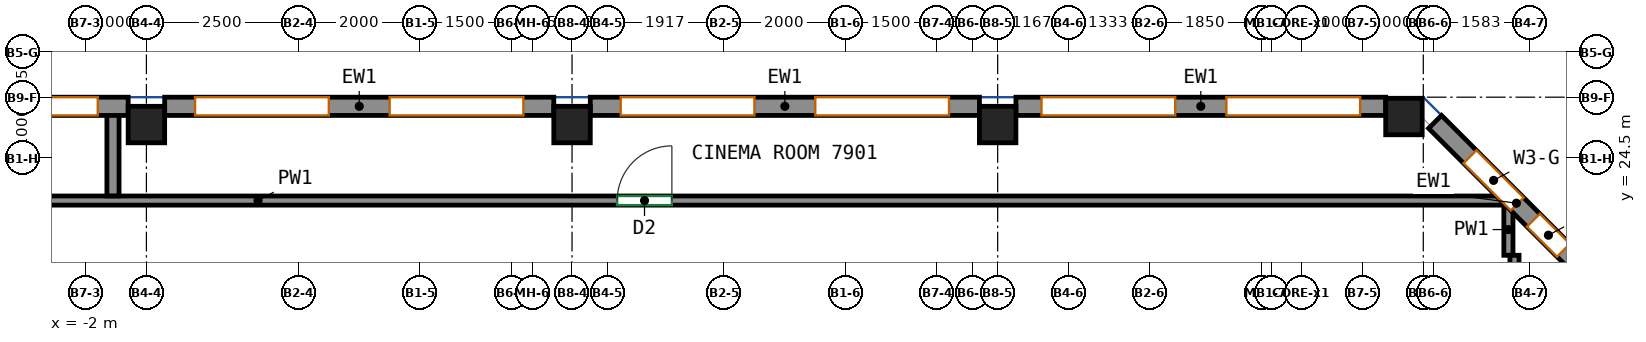
"""IFC4 building model, lengths in metres.
Left out: names, types, materials, properties, quantities, classifications, styles, units other than length and angle.
Written with IfcOpenShell. Run it as: python <this file> out.ifc"""

import sys

from ifc_helpers import new_model, si_unit, direction, frame, frame_2d, origin, origin_2d, place, context, subcontext, project, spatial, rectangle, extrude, source, transform, mapped, element, fill, save


model = new_model("IFC4")
c1 = context("Model", 3, precision=1e-05, world=origin(), true_north=direction((0.0, 1.0)))
c2 = subcontext(c1, "Body", "Model", "MODEL_VIEW")
j1 = project(units=[si_unit("LENGTHUNIT", "METRE"), si_unit("PLANEANGLEUNIT", "RADIAN")], contexts=[c1])
p1 = place(None, origin())
s1 = spatial("IfcSite", under=j1, at=p1, CompositionType="ELEMENT")
p2 = place(p1, origin())
s2 = spatial("IfcBuilding", under=s1, at=p2, CompositionType="ELEMENT")
p3 = place(p2, frame((0.0, 0.0, 315.4)))
s3 = spatial("IfcBuildingStorey", under=s2, at=p3, CompositionType="ELEMENT", Elevation=315.4)
m1 = source(origin(), c2, "Body", "SweptSolid", [
    extrude(rectangle(XDim=0.6, YDim=0.6, at=origin_2d()), origin(), (0.0, 0.0, 1.0), 3.0),
])
for number, where, z_axis, x_axis in (
    (1, (-1.0, 25.05, 0.0), (0.0, 0.0, 1.0), (1.0, 0.0, 0.0)),
    (2, (6.0, 25.05, 0.0), (0.0, 0.0, 1.0), (1.0, 0.0, 0.0)),
    (3, (13.0, 25.05, 0.0), (0.0, 0.0, 1.0), (1.0, 0.0, 0.0)),
    (4, (19.682, 25.182, 0.0), (0.0, 0.0, 1.0), (1.0, 0.0, 0.0)),
):
    element("IfcColumn", number, at=place(p3, frame(where, z_axis=z_axis, x_axis=x_axis)), inside=s3, PredefinedType="COLUMN", context=c2, shape_type="MappedRepresentation", body=[
        mapped(m1, transform((0.0, 0.0, 0.0))),
    ])
m2 = source(origin(), c2, "Body", "SweptSolid", [
    extrude(rectangle(XDim=3.783, YDim=0.3, at=frame_2d((1.892, 0.0))), origin(), (0.0, 0.0, 1.0), 3.0),
])
p4 = place(p3, frame((22.869, 22.419, 0.0), z_axis=(0.0, 0.0, 1.0), x_axis=(-0.707106781187, 0.707106781187, 0.0)))
e5 = element("IfcWall", 5, at=p4, inside=s3, PredefinedType="SOLIDWALL", context=c2, shape_type="MappedRepresentation", body=[
    mapped(m2, transform((0.0, 0.0, 0.0))),
])
p5 = place(p4, frame((0.797, 0.0, 0.8)))
e6 = element("IfcOpeningElement", 6, at=p5, cuts=e5, PredefinedType="OPENING", context=c2, shape_type="SweptSolid", body=[
    extrude(rectangle(XDim=0.7, YDim=2.05, at=frame_2d((0.35, 1.025))), frame((0.0, 0.16, 0.0), z_axis=(0.0, -1.0, 0.0), x_axis=(1.0, 0.0, 0.0)), (0.0, 0.0, 1.0), 0.32),
])
p6 = place(p4, frame((1.872, 0.0, 0.8)))
e7 = element("IfcOpeningElement", 7, at=p6, cuts=e5, PredefinedType="OPENING", context=c2, shape_type="SweptSolid", body=[
    extrude(rectangle(XDim=1.1, YDim=2.05, at=frame_2d((0.55, 1.025))), frame((0.0, 0.16, 0.0), z_axis=(0.0, -1.0, 0.0), x_axis=(1.0, 0.0, 0.0)), (0.0, 0.0, 1.0), 0.32),
])
m3 = source(origin(), c2, "Body", "SweptSolid", [
    extrude(rectangle(XDim=6.082, YDim=0.3, at=frame_2d((3.041, 0.0))), origin(), (0.0, 0.0, 1.0), 3.0),
])
p7 = place(p3, frame((19.382, 25.35, 0.0), z_axis=(0.0, 0.0, 1.0), x_axis=(-1.0, 0.0, 0.0)))
e8 = element("IfcWall", 8, at=p7, inside=s3, PredefinedType="SOLIDWALL", context=c2, shape_type="MappedRepresentation", body=[
    mapped(m3, transform((0.0, 0.0, 0.0))),
])
p8 = place(p7, frame((0.42, 0.0, 0.8)))
e9 = element("IfcOpeningElement", 9, at=p8, cuts=e8, PredefinedType="OPENING", context=c2, shape_type="SweptSolid", body=[
    extrude(rectangle(XDim=2.2, YDim=2.05, at=frame_2d((1.1, 1.025))), frame((0.0, 0.16, 0.0), z_axis=(0.0, -1.0, 0.0), x_axis=(1.0, 0.0, 0.0)), (0.0, 0.0, 1.0), 0.32),
])
p9 = place(p7, frame((3.461, 0.0, 0.8)))
e10 = element("IfcOpeningElement", 10, at=p9, cuts=e8, PredefinedType="OPENING", context=c2, shape_type="SweptSolid", body=[
    extrude(rectangle(XDim=2.2, YDim=2.05, at=frame_2d((1.1, 1.025))), frame((0.0, 0.16, 0.0), z_axis=(0.0, -1.0, 0.0), x_axis=(1.0, 0.0, 0.0)), (0.0, 0.0, 1.0), 0.32),
])
m4 = source(origin(), c2, "Body", "SweptSolid", [
    extrude(rectangle(XDim=6.4, YDim=0.3, at=frame_2d((3.2, 0.0))), origin(), (0.0, 0.0, 1.0), 3.0),
])
p10 = place(p3, frame((12.7, 25.35, 0.0), z_axis=(0.0, 0.0, 1.0), x_axis=(-1.0, 0.0, 0.0)))
e11 = element("IfcWall", 11, at=p10, inside=s3, PredefinedType="SOLIDWALL", context=c2, shape_type="MappedRepresentation", body=[
    mapped(m4, transform((0.0, 0.0, 0.0))),
])
p11 = place(p10, frame((0.5, 0.0, 0.8)))
e12 = element("IfcOpeningElement", 12, at=p11, cuts=e11, PredefinedType="OPENING", context=c2, shape_type="SweptSolid", body=[
    extrude(rectangle(XDim=2.2, YDim=2.05, at=frame_2d((1.1, 1.025))), frame((0.0, 0.16, 0.0), z_axis=(0.0, -1.0, 0.0), x_axis=(1.0, 0.0, 0.0)), (0.0, 0.0, 1.0), 0.32),
])
p12 = place(p10, frame((3.7, 0.0, 0.8)))
e13 = element("IfcOpeningElement", 13, at=p12, cuts=e11, PredefinedType="OPENING", context=c2, shape_type="SweptSolid", body=[
    extrude(rectangle(XDim=2.2, YDim=2.05, at=frame_2d((1.1, 1.025))), frame((0.0, 0.16, 0.0), z_axis=(0.0, -1.0, 0.0), x_axis=(1.0, 0.0, 0.0)), (0.0, 0.0, 1.0), 0.32),
])
p13 = place(p3, frame((5.7, 25.35, 0.0), z_axis=(0.0, 0.0, 1.0), x_axis=(-1.0, 0.0, 0.0)))
e14 = element("IfcWall", 14, at=p13, inside=s3, PredefinedType="SOLIDWALL", context=c2, shape_type="MappedRepresentation", body=[
    mapped(m4, transform((0.0, 0.0, 0.0))),
])
p14 = place(p13, frame((0.5, 0.0, 0.8)))
e15 = element("IfcOpeningElement", 15, at=p14, cuts=e14, PredefinedType="OPENING", context=c2, shape_type="SweptSolid", body=[
    extrude(rectangle(XDim=2.2, YDim=2.05, at=frame_2d((1.1, 1.025))), frame((0.0, 0.16, 0.0), z_axis=(0.0, -1.0, 0.0), x_axis=(1.0, 0.0, 0.0)), (0.0, 0.0, 1.0), 0.32),
])
p15 = place(p13, frame((3.7, 0.0, 0.8)))
e16 = element("IfcOpeningElement", 16, at=p15, cuts=e14, PredefinedType="OPENING", context=c2, shape_type="SweptSolid", body=[
    extrude(rectangle(XDim=2.2, YDim=2.05, at=frame_2d((1.1, 1.025))), frame((0.0, 0.16, 0.0), z_axis=(0.0, -1.0, 0.0), x_axis=(1.0, 0.0, 0.0)), (0.0, 0.0, 1.0), 0.32),
])
p16 = place(p3, frame((-1.3, 25.35, 0.0), z_axis=(0.0, 0.0, 1.0), x_axis=(-1.0, 0.0, 0.0)))
e17 = element("IfcWall", 17, at=p16, inside=s3, PredefinedType="SOLIDWALL", context=c2, shape_type="MappedRepresentation", body=[
    mapped(m4, transform((0.0, 0.0, 0.0))),
])
p17 = place(p16, frame((0.5, 0.0, 0.8)))
e18 = element("IfcOpeningElement", 18, at=p17, cuts=e17, PredefinedType="OPENING", context=c2, shape_type="SweptSolid", body=[
    extrude(rectangle(XDim=2.2, YDim=2.05, at=frame_2d((1.1, 1.025))), frame((0.0, 0.16, 0.0), z_axis=(0.0, -1.0, 0.0), x_axis=(1.0, 0.0, 0.0)), (0.0, 0.0, 1.0), 0.32),
])
p18 = place(p16, frame((3.7, 0.0, 0.8)))
e19 = element("IfcOpeningElement", 19, at=p18, cuts=e17, PredefinedType="OPENING", context=c2, shape_type="SweptSolid", body=[
    extrude(rectangle(XDim=2.2, YDim=2.05, at=frame_2d((1.1, 1.025))), frame((0.0, 0.16, 0.0), z_axis=(0.0, -1.0, 0.0), x_axis=(1.0, 0.0, 0.0)), (0.0, 0.0, 1.0), 0.32),
])
p19 = place(p3, frame((21.4, 22.9, 0.0), z_axis=(0.0, 0.0, 1.0), x_axis=(0.0, 1.0, 0.0)))
e20 = element("IfcWall", 20, at=p19, inside=s3, PredefinedType="PARTITIONING", context=c2, shape_type="SweptSolid", body=[
    extrude(rectangle(XDim=0.846, YDim=0.15, at=frame_2d((0.423, 0.0))), origin(), (0.0, 0.0, 1.0), 3.0),
])
p20 = place(p3, frame((21.5, 18.745, 0.0), z_axis=(0.0, 0.0, 1.0), x_axis=(0.0, 1.0, 0.0)))
e21 = element("IfcWall", 21, at=p20, inside=s3, PredefinedType="PARTITIONING", context=c2, shape_type="SweptSolid", body=[
    extrude(rectangle(XDim=4.155, YDim=0.15, at=frame_2d((2.077, 0.0))), origin(), (0.0, 0.0, 1.0), 3.0),
])
p21 = place(p3, frame((-19.675, 23.8, 0.0), z_axis=(0.0, 0.0, 1.0), x_axis=(1.0, 0.0, 0.0)))
e22 = element("IfcWall", 22, at=p21, inside=s3, PredefinedType="PARTITIONING", context=c2, shape_type="SweptSolid", body=[
    extrude(rectangle(XDim=41.021, YDim=0.15, at=frame_2d((20.51, 0.0))), origin(), (0.0, 0.0, 1.0), 3.0),
])
p22 = place(p21, frame((5.01, 0.0, 0.0)))
e23 = element("IfcOpeningElement", 23, at=p22, cuts=e22, PredefinedType="OPENING", context=c2, shape_type="SweptSolid", body=[
    extrude(rectangle(XDim=0.9, YDim=2.1, at=frame_2d((0.45, 1.05))), frame((0.0, 0.085, 0.0), z_axis=(0.0, -1.0, 0.0), x_axis=(1.0, 0.0, 0.0)), (0.0, 0.0, 1.0), 0.17),
])
p23 = place(p21, frame((26.417, 0.0, 0.0)))
e24 = element("IfcOpeningElement", 24, at=p23, cuts=e22, PredefinedType="OPENING", context=c2, shape_type="SweptSolid", body=[
    extrude(rectangle(XDim=0.9, YDim=2.1, at=frame_2d((0.45, 1.05))), frame((0.0, 0.085, 0.0), z_axis=(0.0, -1.0, 0.0), x_axis=(1.0, 0.0, 0.0)), (0.0, 0.0, 1.0), 0.17),
])
p24 = place(p3, frame((-1.55, 23.877, 0.0), z_axis=(0.0, 0.0, 1.0), x_axis=(0.0, 1.0, 0.0)))
e25 = element("IfcWall", 25, at=p24, inside=s3, PredefinedType="PARTITIONING", context=c2, shape_type="SweptSolid", body=[
    extrude(rectangle(XDim=1.373, YDim=0.2, at=frame_2d((0.687, 0.0))), origin(), (0.0, 0.0, 1.0), 3.0),
])
p25 = place(p5, origin())
e26 = element("IfcWindow", 26, at=p25, inside=s3, PartitioningType="SINGLE_PANEL", PredefinedType="WINDOW", context=c2, shape_type="SweptSolid", body=[
    extrude(rectangle(XDim=0.7, YDim=2.05, at=frame_2d((0.35, 1.025))), frame((0.0, 0.03, 0.0), z_axis=(0.0, -1.0, 0.0), x_axis=(1.0, 0.0, 0.0)), (0.0, 0.0, 1.0), 0.06),
])
fill(e6, e26)
p26 = place(p8, origin())
e27 = element("IfcWindow", 27, at=p26, inside=s3, PartitioningType="SINGLE_PANEL", PredefinedType="WINDOW", context=c2, shape_type="SweptSolid", body=[
    extrude(rectangle(XDim=2.2, YDim=2.05, at=frame_2d((1.1, 1.025))), frame((0.0, 0.03, 0.0), z_axis=(0.0, -1.0, 0.0), x_axis=(1.0, 0.0, 0.0)), (0.0, 0.0, 1.0), 0.06),
])
fill(e9, e27)
p27 = place(p9, origin())
e28 = element("IfcWindow", 28, at=p27, inside=s3, PartitioningType="SINGLE_PANEL", PredefinedType="WINDOW", context=c2, shape_type="SweptSolid", body=[
    extrude(rectangle(XDim=2.2, YDim=2.05, at=frame_2d((1.1, 1.025))), frame((0.0, 0.03, 0.0), z_axis=(0.0, -1.0, 0.0), x_axis=(1.0, 0.0, 0.0)), (0.0, 0.0, 1.0), 0.06),
])
fill(e10, e28)
p28 = place(p11, origin())
e29 = element("IfcWindow", 29, at=p28, inside=s3, PartitioningType="SINGLE_PANEL", PredefinedType="WINDOW", context=c2, shape_type="SweptSolid", body=[
    extrude(rectangle(XDim=2.2, YDim=2.05, at=frame_2d((1.1, 1.025))), frame((0.0, 0.03, 0.0), z_axis=(0.0, -1.0, 0.0), x_axis=(1.0, 0.0, 0.0)), (0.0, 0.0, 1.0), 0.06),
])
fill(e12, e29)
p29 = place(p12, origin())
e30 = element("IfcWindow", 30, at=p29, inside=s3, PartitioningType="SINGLE_PANEL", PredefinedType="WINDOW", context=c2, shape_type="SweptSolid", body=[
    extrude(rectangle(XDim=2.2, YDim=2.05, at=frame_2d((1.1, 1.025))), frame((0.0, 0.03, 0.0), z_axis=(0.0, -1.0, 0.0), x_axis=(1.0, 0.0, 0.0)), (0.0, 0.0, 1.0), 0.06),
])
fill(e13, e30)
p30 = place(p14, origin())
e31 = element("IfcWindow", 31, at=p30, inside=s3, PartitioningType="SINGLE_PANEL", PredefinedType="WINDOW", context=c2, shape_type="SweptSolid", body=[
    extrude(rectangle(XDim=2.2, YDim=2.05, at=frame_2d((1.1, 1.025))), frame((0.0, 0.03, 0.0), z_axis=(0.0, -1.0, 0.0), x_axis=(1.0, 0.0, 0.0)), (0.0, 0.0, 1.0), 0.06),
])
fill(e15, e31)
p31 = place(p15, origin())
e32 = element("IfcWindow", 32, at=p31, inside=s3, PartitioningType="SINGLE_PANEL", PredefinedType="WINDOW", context=c2, shape_type="SweptSolid", body=[
    extrude(rectangle(XDim=2.2, YDim=2.05, at=frame_2d((1.1, 1.025))), frame((0.0, 0.03, 0.0), z_axis=(0.0, -1.0, 0.0), x_axis=(1.0, 0.0, 0.0)), (0.0, 0.0, 1.0), 0.06),
])
fill(e16, e32)
p32 = place(p17, origin())
e33 = element("IfcWindow", 33, at=p32, inside=s3, PartitioningType="SINGLE_PANEL", PredefinedType="WINDOW", context=c2, shape_type="SweptSolid", body=[
    extrude(rectangle(XDim=2.2, YDim=2.05, at=frame_2d((1.1, 1.025))), frame((0.0, 0.03, 0.0), z_axis=(0.0, -1.0, 0.0), x_axis=(1.0, 0.0, 0.0)), (0.0, 0.0, 1.0), 0.06),
])
fill(e18, e33)
p33 = place(p23, origin())
e34 = element("IfcDoor", 34, at=p33, inside=s3, OperationType="SINGLE_SWING_RIGHT", PredefinedType="DOOR", context=c2, shape_type="SweptSolid", body=[
    extrude(rectangle(XDim=0.9, YDim=2.1, at=frame_2d((0.45, 1.05))), frame((0.0, 0.025, 0.0), z_axis=(0.0, -1.0, 0.0), x_axis=(1.0, 0.0, 0.0)), (0.0, 0.0, 1.0), 0.05),
])
fill(e24, e34)
p34 = place(p6, origin())
e35 = element("IfcWindow", 35, at=p34, inside=s3, PartitioningType="SINGLE_PANEL", PredefinedType="WINDOW", context=c2, shape_type="SweptSolid", body=[
    extrude(rectangle(XDim=1.1, YDim=2.05, at=frame_2d((0.55, 1.025))), frame((0.0, 0.03, 0.0), z_axis=(0.0, -1.0, 0.0), x_axis=(1.0, 0.0, 0.0)), (0.0, 0.0, 1.0), 0.06),
])
fill(e7, e35)
save(model, sys.argv[1])
